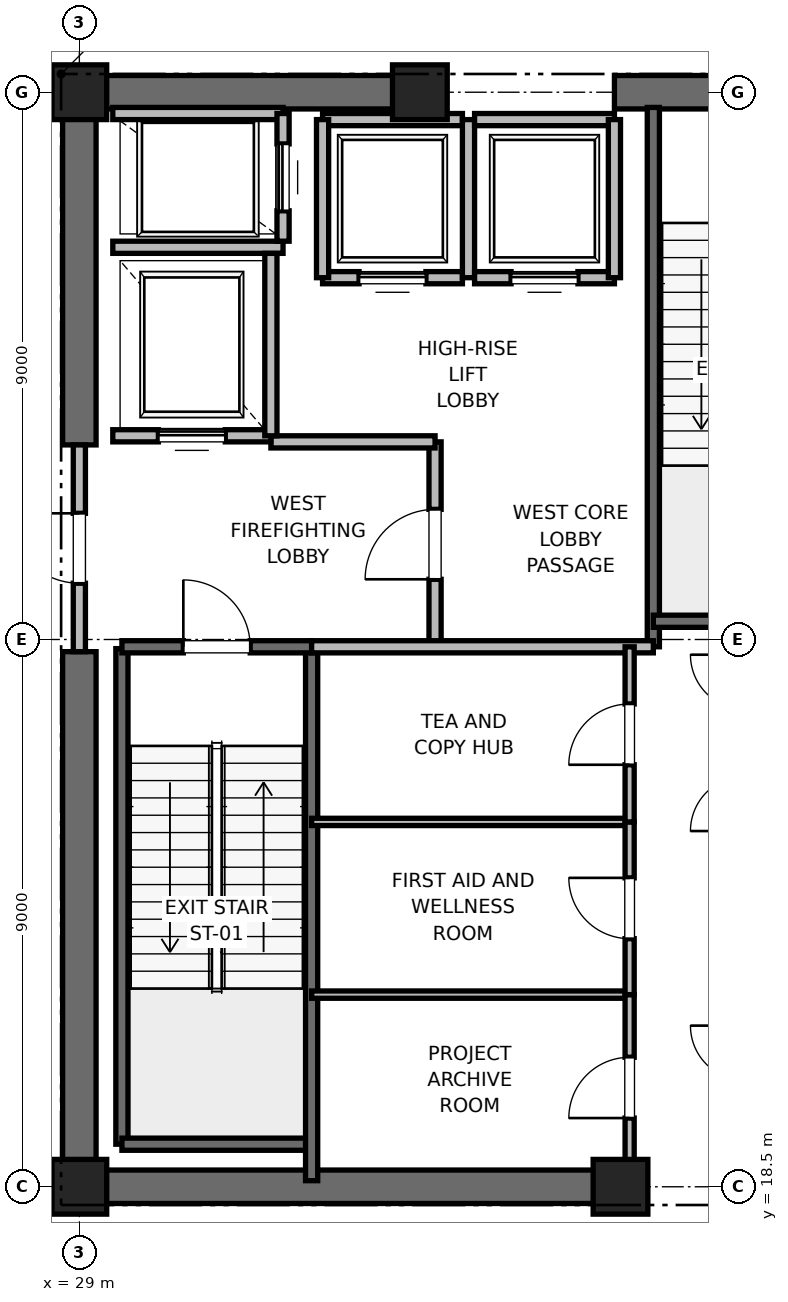
"""IFC4 building model, lengths in metres.
Left out: names, types, materials, properties, quantities, classifications, styles, units other than length and angle.
Written with IfcOpenShell. Run it as: python <this file> out.ifc"""

import sys

from ifc_helpers import new_model, si_unit, direction, frame, frame_2d, origin, origin_2d, place, context, subcontext, project, spatial, rectangle, extrude, element, fill, save


model = new_model("IFC4")
c1 = context("Model", 3, precision=1e-05, world=origin(), true_north=direction((0.0, 1.0)))
c2 = subcontext(c1, "Body", "Model", "MODEL_VIEW")
j1 = project(units=[si_unit("LENGTHUNIT", "METRE"), si_unit("PLANEANGLEUNIT", "RADIAN")], contexts=[c1])
p1 = place(None, origin())
s1 = spatial("IfcSite", under=j1, at=p1, CompositionType="ELEMENT")
p2 = place(p1, origin())
s2 = spatial("IfcBuilding", under=s1, at=p2, CompositionType="ELEMENT")
p3 = place(p2, frame((0.0, 0.0, 233.2)))
s3 = spatial("IfcBuildingStorey", under=s2, at=p3, CompositionType="ELEMENT", Elevation=233.2)
for number, where, z_axis, x_axis in (
    (1, (29.0, 18.5, 0.0), (0.0, 0.0, 1.0), (1.0, 0.0, 0.0)),
    (2, (29.0, 36.5, 0.0), (0.0, 0.0, 1.0), (1.0, 0.0, 0.0)),
    (3, (37.9, 18.5, 0.0), (0.0, 0.0, 1.0), (1.0, 0.0, 0.0)),
    (4, (34.6, 36.5, 0.0), (0.0, 0.0, 1.0), (1.0, 0.0, 0.0)),
):
    element("IfcColumn", number, at=place(p3, frame(where, z_axis=z_axis, x_axis=x_axis)), inside=s3, PredefinedType="PILASTER", context=c2, shape_type="SweptSolid", body=[
        extrude(rectangle(XDim=0.9, YDim=0.9, at=origin_2d()), origin(), (0.0, 0.0, 1.0), 5.0),
    ])
p4 = place(p3, frame((29.0, 18.5, 0.0), z_axis=(0.0, 0.0, 1.0), x_axis=(1.0, 0.0, 0.0)))
e5 = element("IfcWall", 5, at=p4, inside=s3, PredefinedType="SHEAR", context=c2, shape_type="SweptSolid", body=[
    extrude(rectangle(XDim=9.2, YDim=0.55, at=frame_2d((4.6, 0.0))), origin(), (0.0, 0.0, 1.0), 4.7),
])
p5 = place(p3, frame((29.0, 36.5, 0.0), z_axis=(0.0, 0.0, 1.0), x_axis=(1.0, 0.0, 0.0)))
e6 = element("IfcWall", 6, at=p5, inside=s3, PredefinedType="SHEAR", context=c2, shape_type="SweptSolid", body=[
    extrude(rectangle(XDim=5.8, YDim=0.55, at=frame_2d((2.9, 0.0))), origin(), (0.0, 0.0, 1.0), 4.7),
])
p6 = place(p3, frame((37.8, 36.5, 0.0), z_axis=(0.0, 0.0, 1.0), x_axis=(1.0, 0.0, 0.0)))
e7 = element("IfcWall", 7, at=p6, inside=s3, PredefinedType="SHEAR", context=c2, shape_type="SweptSolid", body=[
    extrude(rectangle(XDim=4.4, YDim=0.55, at=frame_2d((2.2, 0.0))), origin(), (0.0, 0.0, 1.0), 4.7),
])
p7 = place(p6, frame((1.65, 0.0, 0.0)))
e8 = element("IfcOpeningElement", 8, at=p7, cuts=e7, PredefinedType="OPENING", context=c2, shape_type="SweptSolid", body=[
    extrude(rectangle(XDim=1.1, YDim=2.15, at=frame_2d((0.55, 1.075))), frame((0.0, 0.275, 0.0), z_axis=(0.0, -1.0, 0.0), x_axis=(1.0, 0.0, 0.0)), (0.0, 0.0, 1.0), 0.55),
])
p8 = place(p3, frame((29.0, 18.5, 0.0), z_axis=(0.0, 0.0, 1.0), x_axis=(0.0, 1.0, 0.0)))
e9 = element("IfcWall", 9, at=p8, inside=s3, PredefinedType="SHEAR", context=c2, shape_type="SweptSolid", body=[
    extrude(rectangle(XDim=8.8, YDim=0.55, at=frame_2d((4.4, 0.0))), origin(), (0.0, 0.0, 1.0), 4.7),
])
p9 = place(p3, frame((29.0, 30.7, 0.0), z_axis=(0.0, 0.0, 1.0), x_axis=(0.0, 1.0, 0.0)))
e10 = element("IfcWall", 10, at=p9, inside=s3, PredefinedType="SHEAR", context=c2, shape_type="SweptSolid", body=[
    extrude(rectangle(XDim=5.8, YDim=0.55, at=frame_2d((2.9, 0.0))), origin(), (0.0, 0.0, 1.0), 4.7),
])
p10 = place(p3, frame((29.7, 19.2, 0.0), z_axis=(0.0, 0.0, 1.0), x_axis=(0.0, 1.0, 0.0)))
e11 = element("IfcWall", 11, at=p10, inside=s3, PredefinedType="SOLIDWALL", context=c2, shape_type="SweptSolid", body=[
    extrude(rectangle(XDim=8.15, YDim=0.2, at=frame_2d((4.075, 0.0))), origin(), (0.0, 0.0, 1.0), 4.7),
])
p11 = place(p3, frame((29.7, 19.2, 0.0), z_axis=(0.0, 0.0, 1.0), x_axis=(1.0, 0.0, 0.0)))
e12 = element("IfcWall", 12, at=p11, inside=s3, PredefinedType="SOLIDWALL", context=c2, shape_type="SweptSolid", body=[
    extrude(rectangle(XDim=3.12, YDim=0.2, at=frame_2d((1.56, 0.0))), origin(), (0.0, 0.0, 1.0), 4.7),
])
p12 = place(p3, frame((32.82, 18.6, 0.0), z_axis=(0.0, 0.0, 1.0), x_axis=(0.0, 1.0, 0.0)))
e13 = element("IfcWall", 13, at=p12, inside=s3, PredefinedType="SOLIDWALL", context=c2, shape_type="SweptSolid", body=[
    extrude(rectangle(XDim=8.78, YDim=0.2, at=frame_2d((4.39, 0.0))), origin(), (0.0, 0.0, 1.0), 4.7),
])
p13 = place(p3, frame((29.7, 27.38, 0.0), z_axis=(0.0, 0.0, 1.0), x_axis=(1.0, 0.0, 0.0)))
e14 = element("IfcWall", 14, at=p13, inside=s3, PredefinedType="SOLIDWALL", context=c2, shape_type="SweptSolid", body=[
    extrude(rectangle(XDim=3.12, YDim=0.2, at=frame_2d((1.56, 0.0))), origin(), (0.0, 0.0, 1.0), 4.7),
])
p14 = place(p13, frame((1.01, 0.0, 0.0)))
e15 = element("IfcOpeningElement", 15, at=p14, cuts=e14, PredefinedType="OPENING", context=c2, shape_type="SweptSolid", body=[
    extrude(rectangle(XDim=1.1, YDim=2.15, at=frame_2d((0.55, 1.075))), frame((0.0, 0.1, 0.0), z_axis=(0.0, -1.0, 0.0), x_axis=(1.0, 0.0, 0.0)), (0.0, 0.0, 1.0), 0.2),
])
p15 = place(p3, frame((38.44, 27.38, 0.0), z_axis=(0.0, 0.0, 1.0), x_axis=(0.0, 1.0, 0.0)))
e16 = element("IfcWall", 16, at=p15, inside=s3, PredefinedType="SOLIDWALL", context=c2, shape_type="SweptSolid", body=[
    extrude(rectangle(XDim=8.87, YDim=0.2, at=frame_2d((4.435, 0.0))), origin(), (0.0, 0.0, 1.0), 4.7),
])
p16 = place(p3, frame((38.44, 27.8, 0.0), z_axis=(0.0, 0.0, 1.0), x_axis=(1.0, 0.0, 0.0)))
e17 = element("IfcWall", 17, at=p16, inside=s3, PredefinedType="SOLIDWALL", context=c2, shape_type="SweptSolid", body=[
    extrude(rectangle(XDim=3.32, YDim=0.2, at=frame_2d((1.66, 0.0))), origin(), (0.0, 0.0, 1.0), 4.7),
])
p17 = place(p3, frame((34.85, 27.38, 0.0), z_axis=(0.0, 0.0, 1.0), x_axis=(0.0, 1.0, 0.0)))
e18 = element("IfcWall", 18, at=p17, inside=s3, PredefinedType="PARTITIONING", context=c2, shape_type="SweptSolid", body=[
    extrude(rectangle(XDim=3.37, YDim=0.2, at=frame_2d((1.685, 0.0))), origin(), (0.0, 0.0, 1.0), 4.7),
])
p18 = place(p17, frame((1.11, 0.0, 0.0)))
e19 = element("IfcOpeningElement", 19, at=p18, cuts=e18, PredefinedType="OPENING", context=c2, shape_type="SweptSolid", body=[
    extrude(rectangle(XDim=1.15, YDim=2.2, at=frame_2d((0.575, 1.1))), frame((0.0, 0.1, 0.0), z_axis=(0.0, -1.0, 0.0), x_axis=(1.0, 0.0, 0.0)), (0.0, 0.0, 1.0), 0.2),
])
p19 = place(p3, frame((29.0, 27.3, 0.0), z_axis=(0.0, 0.0, 1.0), x_axis=(0.0, 1.0, 0.0)))
e20 = element("IfcWall", 20, at=p19, inside=s3, PredefinedType="PARTITIONING", context=c2, shape_type="SweptSolid", body=[
    extrude(rectangle(XDim=3.4, YDim=0.2, at=frame_2d((1.7, 0.0))), origin(), (0.0, 0.0, 1.0), 3.68),
])
p20 = place(p19, frame((1.125, 0.0, 0.0)))
e21 = element("IfcOpeningElement", 21, at=p20, cuts=e20, PredefinedType="OPENING", context=c2, shape_type="SweptSolid", body=[
    extrude(rectangle(XDim=1.15, YDim=2.2, at=frame_2d((0.575, 1.1))), frame((0.0, 0.1, 0.0), z_axis=(0.0, -1.0, 0.0), x_axis=(1.0, 0.0, 0.0)), (0.0, 0.0, 1.0), 0.2),
])
p21 = place(p3, frame((32.82, 27.38, 0.0), z_axis=(0.0, 0.0, 1.0), x_axis=(1.0, 0.0, 0.0)))
e22 = element("IfcWall", 22, at=p21, inside=s3, PredefinedType="PARTITIONING", context=c2, shape_type="SweptSolid", body=[
    extrude(rectangle(XDim=5.62, YDim=0.2, at=frame_2d((2.81, 0.0))), origin(), (0.0, 0.0, 1.0), 4.7),
])
p22 = place(p3, frame((32.15, 30.75, 0.0), z_axis=(0.0, 0.0, 1.0), x_axis=(1.0, 0.0, 0.0)))
e23 = element("IfcWall", 23, at=p22, inside=s3, PredefinedType="PARTITIONING", context=c2, shape_type="SweptSolid", body=[
    extrude(rectangle(XDim=2.7, YDim=0.2, at=frame_2d((1.35, 0.0))), origin(), (0.0, 0.0, 1.0), 4.7),
])
p23 = place(p3, frame((29.55, 30.85, 0.0), z_axis=(0.0, 0.0, 1.0), x_axis=(1.0, 0.0, 0.0)))
e24 = element("IfcWall", 24, at=p23, inside=s3, PredefinedType="SOLIDWALL", context=c2, shape_type="SweptSolid", body=[
    extrude(rectangle(XDim=2.6, YDim=0.2, at=frame_2d((1.3, 0.0))), origin(), (0.0, 0.0, 1.0), 3.68),
])
p24 = place(p23, frame((0.75, 0.0, 0.0)))
e25 = element("IfcOpeningElement", 25, at=p24, cuts=e24, PredefinedType="OPENING", context=c2, shape_type="SweptSolid", body=[
    extrude(rectangle(XDim=1.1, YDim=2.2, at=frame_2d((0.55, 1.1))), frame((0.0, 0.1, 0.0), z_axis=(0.0, -1.0, 0.0), x_axis=(1.0, 0.0, 0.0)), (0.0, 0.0, 1.0), 0.2),
])
p25 = place(p3, frame((29.55, 33.95, 0.0), z_axis=(0.0, 0.0, 1.0), x_axis=(1.0, 0.0, 0.0)))
e26 = element("IfcWall", 26, at=p25, inside=s3, PredefinedType="SOLIDWALL", context=c2, shape_type="SweptSolid", body=[
    extrude(rectangle(XDim=2.8, YDim=0.2, at=frame_2d((1.4, 0.0))), origin(), (0.0, 0.0, 1.0), 4.7),
])
p26 = place(p3, frame((32.15, 30.85, 0.0), z_axis=(0.0, 0.0, 1.0), x_axis=(0.0, 1.0, 0.0)))
e27 = element("IfcWall", 27, at=p26, inside=s3, PredefinedType="SOLIDWALL", context=c2, shape_type="SweptSolid", body=[
    extrude(rectangle(XDim=3.0, YDim=0.2, at=frame_2d((1.5, 0.0))), origin(), (0.0, 0.0, 1.0), 4.7),
])
p27 = place(p3, frame((32.35, 36.15, 0.0), z_axis=(0.0, 0.0, 1.0), x_axis=(-1.0, 0.0, 0.0)))
e28 = element("IfcWall", 28, at=p27, inside=s3, PredefinedType="SOLIDWALL", context=c2, shape_type="SweptSolid", body=[
    extrude(rectangle(XDim=2.8, YDim=0.2, at=frame_2d((1.4, 0.0))), origin(), (0.0, 0.0, 1.0), 3.987),
])
p28 = place(p3, frame((32.35, 34.05, 0.0), z_axis=(0.0, 0.0, 1.0), x_axis=(0.0, 1.0, 0.0)))
e29 = element("IfcWall", 29, at=p28, inside=s3, PredefinedType="SOLIDWALL", context=c2, shape_type="SweptSolid", body=[
    extrude(rectangle(XDim=2.1, YDim=0.2, at=frame_2d((1.05, 0.0))), origin(), (0.0, 0.0, 1.0), 4.7),
])
p29 = place(p28, frame((0.5, 0.0, 0.0)))
e30 = element("IfcOpeningElement", 30, at=p29, cuts=e29, PredefinedType="OPENING", context=c2, shape_type="SweptSolid", body=[
    extrude(rectangle(XDim=1.1, YDim=2.2, at=frame_2d((0.55, 1.1))), frame((0.0, 0.1, 0.0), z_axis=(0.0, -1.0, 0.0), x_axis=(1.0, 0.0, 0.0)), (0.0, 0.0, 1.0), 0.2),
])
p30 = place(p3, frame((33.0, 33.45, 0.0), z_axis=(0.0, 0.0, 1.0), x_axis=(1.0, 0.0, 0.0)))
e31 = element("IfcWall", 31, at=p30, inside=s3, PredefinedType="SOLIDWALL", context=c2, shape_type="SweptSolid", body=[
    extrude(rectangle(XDim=2.3, YDim=0.2, at=frame_2d((1.15, 0.0))), origin(), (0.0, 0.0, 1.0), 4.7),
])
p31 = place(p30, frame((0.6, 0.0, 0.0)))
e32 = element("IfcOpeningElement", 32, at=p31, cuts=e31, PredefinedType="OPENING", context=c2, shape_type="SweptSolid", body=[
    extrude(rectangle(XDim=1.1, YDim=2.2, at=frame_2d((0.55, 1.1))), frame((0.0, 0.1, 0.0), z_axis=(0.0, -1.0, 0.0), x_axis=(1.0, 0.0, 0.0)), (0.0, 0.0, 1.0), 0.2),
])
p32 = place(p3, frame((35.3, 36.05, 0.0), z_axis=(0.0, 0.0, 1.0), x_axis=(-1.0, 0.0, 0.0)))
e33 = element("IfcWall", 33, at=p32, inside=s3, PredefinedType="SOLIDWALL", context=c2, shape_type="SweptSolid", body=[
    extrude(rectangle(XDim=2.3, YDim=0.2, at=frame_2d((1.15, 0.0))), origin(), (0.0, 0.0, 1.0), 3.68),
])
p33 = place(p3, frame((33.0, 36.05, 0.0), z_axis=(0.0, 0.0, 1.0), x_axis=(0.0, -1.0, 0.0)))
e34 = element("IfcWall", 34, at=p33, inside=s3, PredefinedType="SOLIDWALL", context=c2, shape_type="SweptSolid", body=[
    extrude(rectangle(XDim=2.6, YDim=0.2, at=frame_2d((1.3, 0.0))), origin(), (0.0, 0.0, 1.0), 4.7),
])
p34 = place(p3, frame((35.4, 33.45, 0.0), z_axis=(0.0, 0.0, 1.0), x_axis=(0.0, 1.0, 0.0)))
e35 = element("IfcWall", 35, at=p34, inside=s3, PredefinedType="SOLIDWALL", context=c2, shape_type="SweptSolid", body=[
    extrude(rectangle(XDim=2.6, YDim=0.2, at=frame_2d((1.3, 0.0))), origin(), (0.0, 0.0, 1.0), 3.68),
])
p35 = place(p3, frame((35.5, 33.45, 0.0), z_axis=(0.0, 0.0, 1.0), x_axis=(1.0, 0.0, 0.0)))
e36 = element("IfcWall", 36, at=p35, inside=s3, PredefinedType="SOLIDWALL", context=c2, shape_type="SweptSolid", body=[
    extrude(rectangle(XDim=2.3, YDim=0.2, at=frame_2d((1.15, 0.0))), origin(), (0.0, 0.0, 1.0), 4.7),
])
p36 = place(p35, frame((0.6, 0.0, 0.0)))
e37 = element("IfcOpeningElement", 37, at=p36, cuts=e36, PredefinedType="OPENING", context=c2, shape_type="SweptSolid", body=[
    extrude(rectangle(XDim=1.1, YDim=2.2, at=frame_2d((0.55, 1.1))), frame((0.0, 0.1, 0.0), z_axis=(0.0, -1.0, 0.0), x_axis=(1.0, 0.0, 0.0)), (0.0, 0.0, 1.0), 0.2),
])
p37 = place(p3, frame((37.8, 36.05, 0.0), z_axis=(0.0, 0.0, 1.0), x_axis=(-1.0, 0.0, 0.0)))
e38 = element("IfcWall", 38, at=p37, inside=s3, PredefinedType="SOLIDWALL", context=c2, shape_type="SweptSolid", body=[
    extrude(rectangle(XDim=2.3, YDim=0.2, at=frame_2d((1.15, 0.0))), origin(), (0.0, 0.0, 1.0), 3.68),
])
p38 = place(p3, frame((37.8, 33.45, 0.0), z_axis=(0.0, 0.0, 1.0), x_axis=(0.0, 1.0, 0.0)))
e39 = element("IfcWall", 39, at=p38, inside=s3, PredefinedType="SOLIDWALL", context=c2, shape_type="SweptSolid", body=[
    extrude(rectangle(XDim=2.6, YDim=0.2, at=frame_2d((1.3, 0.0))), origin(), (0.0, 0.0, 1.0), 3.68),
])
for number, where, z_axis, x_axis in (
    (40, (32.82, 21.66, 0.0), (0.0, 0.0, 1.0), (1.0, 0.0, 0.0)),
    (41, (32.82, 24.5, 0.0), (0.0, 0.0, 1.0), (1.0, 0.0, 0.0)),
):
    element("IfcWall", number, at=place(p3, frame(where, z_axis=z_axis, x_axis=x_axis)), inside=s3, PredefinedType="PARTITIONING", context=c2, shape_type="SweptSolid", body=[
        extrude(rectangle(XDim=5.23, YDim=0.12, at=frame_2d((2.615, 0.0))), origin(), (0.0, 0.0, 1.0), 2.85),
    ])
p39 = place(p3, frame((38.05, 18.6, 0.0), z_axis=(0.0, 0.0, 1.0), x_axis=(0.0, 1.0, 0.0)))
e42 = element("IfcWall", 42, at=p39, inside=s3, PredefinedType="PARTITIONING", context=c2, shape_type="SweptSolid", body=[
    extrude(rectangle(XDim=3.06, YDim=0.15, at=frame_2d((1.53, 0.0))), origin(), (0.0, 0.0, 1.0), 2.85),
])
p40 = place(p39, frame((1.03, 0.0, 0.0)))
e43 = element("IfcOpeningElement", 43, at=p40, cuts=e42, PredefinedType="OPENING", context=c2, shape_type="SweptSolid", body=[
    extrude(rectangle(XDim=1.0, YDim=2.15, at=frame_2d((0.5, 1.075))), frame((0.0, 0.075, 0.0), z_axis=(0.0, -1.0, 0.0), x_axis=(1.0, 0.0, 0.0)), (0.0, 0.0, 1.0), 0.15),
])
p41 = place(p3, frame((38.05, 21.66, 0.0), z_axis=(0.0, 0.0, 1.0), x_axis=(0.0, 1.0, 0.0)))
e44 = element("IfcWall", 44, at=p41, inside=s3, PredefinedType="PARTITIONING", context=c2, shape_type="SweptSolid", body=[
    extrude(rectangle(XDim=2.84, YDim=0.15, at=frame_2d((1.42, 0.0))), origin(), (0.0, 0.0, 1.0), 2.85),
])
p42 = place(p41, frame((0.92, 0.0, 0.0)))
e45 = element("IfcOpeningElement", 45, at=p42, cuts=e44, PredefinedType="OPENING", context=c2, shape_type="SweptSolid", body=[
    extrude(rectangle(XDim=1.0, YDim=2.15, at=frame_2d((0.5, 1.075))), frame((0.0, 0.075, 0.0), z_axis=(0.0, -1.0, 0.0), x_axis=(1.0, 0.0, 0.0)), (0.0, 0.0, 1.0), 0.15),
])
p43 = place(p3, frame((38.05, 24.5, 0.0), z_axis=(0.0, 0.0, 1.0), x_axis=(0.0, 1.0, 0.0)))
e46 = element("IfcWall", 46, at=p43, inside=s3, PredefinedType="PARTITIONING", context=c2, shape_type="SweptSolid", body=[
    extrude(rectangle(XDim=2.88, YDim=0.15, at=frame_2d((1.44, 0.0))), origin(), (0.0, 0.0, 1.0), 2.85),
])
p44 = place(p43, frame((0.94, 0.0, 0.0)))
e47 = element("IfcOpeningElement", 47, at=p44, cuts=e46, PredefinedType="OPENING", context=c2, shape_type="SweptSolid", body=[
    extrude(rectangle(XDim=1.0, YDim=2.15, at=frame_2d((0.5, 1.075))), frame((0.0, 0.075, 0.0), z_axis=(0.0, -1.0, 0.0), x_axis=(1.0, 0.0, 0.0)), (0.0, 0.0, 1.0), 0.15),
])
p45 = place(p14, origin())
e48 = element("IfcDoor", 48, at=p45, inside=s3, OperationType="SINGLE_SWING_LEFT", PredefinedType="DOOR", context=c2, shape_type="SweptSolid", body=[
    extrude(rectangle(XDim=1.1, YDim=2.15, at=frame_2d((0.55, 1.075))), frame((0.0, 0.025, 0.0), z_axis=(0.0, -1.0, 0.0), x_axis=(1.0, 0.0, 0.0)), (0.0, 0.0, 1.0), 0.05),
])
fill(e15, e48)
p46 = place(p18, origin())
e49 = element("IfcDoor", 49, at=p46, inside=s3, OperationType="SINGLE_SWING_LEFT", PredefinedType="DOOR", context=c2, shape_type="SweptSolid", body=[
    extrude(rectangle(XDim=1.15, YDim=2.2, at=frame_2d((0.575, 1.1))), frame((0.0, 0.025, 0.0), z_axis=(0.0, -1.0, 0.0), x_axis=(1.0, 0.0, 0.0)), (0.0, 0.0, 1.0), 0.05),
])
fill(e19, e49)
p47 = place(p20, origin())
e50 = element("IfcDoor", 50, at=p47, inside=s3, OperationType="SINGLE_SWING_RIGHT", PredefinedType="DOOR", context=c2, shape_type="SweptSolid", body=[
    extrude(rectangle(XDim=1.15, YDim=2.2, at=frame_2d((0.575, 1.1))), frame((0.0, 0.025, 0.0), z_axis=(0.0, -1.0, 0.0), x_axis=(1.0, 0.0, 0.0)), (0.0, 0.0, 1.0), 0.05),
])
fill(e21, e50)
p48 = place(p24, origin())
e51 = element("IfcDoor", 51, at=p48, inside=s3, OperationType="SLIDING_TO_RIGHT", PredefinedType="DOOR", context=c2, shape_type="SweptSolid", body=[
    extrude(rectangle(XDim=1.1, YDim=2.2, at=frame_2d((0.55, 1.1))), frame((0.0, 0.025, 0.0), z_axis=(0.0, -1.0, 0.0), x_axis=(1.0, 0.0, 0.0)), (0.0, 0.0, 1.0), 0.05),
])
fill(e25, e51)
p49 = place(p29, origin())
e52 = element("IfcDoor", 52, at=p49, inside=s3, OperationType="SLIDING_TO_RIGHT", PredefinedType="DOOR", context=c2, shape_type="SweptSolid", body=[
    extrude(rectangle(XDim=1.1, YDim=2.2, at=frame_2d((0.55, 1.1))), frame((0.0, 0.025, 0.0), z_axis=(0.0, -1.0, 0.0), x_axis=(1.0, 0.0, 0.0)), (0.0, 0.0, 1.0), 0.05),
])
fill(e30, e52)
p50 = place(p31, origin())
e53 = element("IfcDoor", 53, at=p50, inside=s3, OperationType="SLIDING_TO_RIGHT", PredefinedType="DOOR", context=c2, shape_type="SweptSolid", body=[
    extrude(rectangle(XDim=1.1, YDim=2.2, at=frame_2d((0.55, 1.1))), frame((0.0, 0.025, 0.0), z_axis=(0.0, -1.0, 0.0), x_axis=(1.0, 0.0, 0.0)), (0.0, 0.0, 1.0), 0.05),
])
fill(e32, e53)
p51 = place(p36, origin())
e54 = element("IfcDoor", 54, at=p51, inside=s3, OperationType="SLIDING_TO_RIGHT", PredefinedType="DOOR", context=c2, shape_type="SweptSolid", body=[
    extrude(rectangle(XDim=1.1, YDim=2.2, at=frame_2d((0.55, 1.1))), frame((0.0, 0.025, 0.0), z_axis=(0.0, -1.0, 0.0), x_axis=(1.0, 0.0, 0.0)), (0.0, 0.0, 1.0), 0.05),
])
fill(e37, e54)
p52 = place(p40, origin())
e55 = element("IfcDoor", 55, at=p52, inside=s3, OperationType="SINGLE_SWING_LEFT", PredefinedType="DOOR", context=c2, shape_type="SweptSolid", body=[
    extrude(rectangle(XDim=1.0, YDim=2.15, at=frame_2d((0.5, 1.075))), frame((0.0, 0.025, 0.0), z_axis=(0.0, -1.0, 0.0), x_axis=(1.0, 0.0, 0.0)), (0.0, 0.0, 1.0), 0.05),
])
fill(e43, e55)
p53 = place(p42, origin())
e56 = element("IfcDoor", 56, at=p53, inside=s3, OperationType="SINGLE_SWING_RIGHT", PredefinedType="DOOR", context=c2, shape_type="SweptSolid", body=[
    extrude(rectangle(XDim=1.0, YDim=2.15, at=frame_2d((0.5, 1.075))), frame((0.0, 0.025, 0.0), z_axis=(0.0, -1.0, 0.0), x_axis=(1.0, 0.0, 0.0)), (0.0, 0.0, 1.0), 0.05),
])
fill(e45, e56)
p54 = place(p44, origin())
e57 = element("IfcDoor", 57, at=p54, inside=s3, OperationType="SINGLE_SWING_LEFT", PredefinedType="DOOR", context=c2, shape_type="SweptSolid", body=[
    extrude(rectangle(XDim=1.0, YDim=2.15, at=frame_2d((0.5, 1.075))), frame((0.0, 0.025, 0.0), z_axis=(0.0, -1.0, 0.0), x_axis=(1.0, 0.0, 0.0)), (0.0, 0.0, 1.0), 0.05),
])
fill(e47, e57)
save(model, sys.argv[1])
